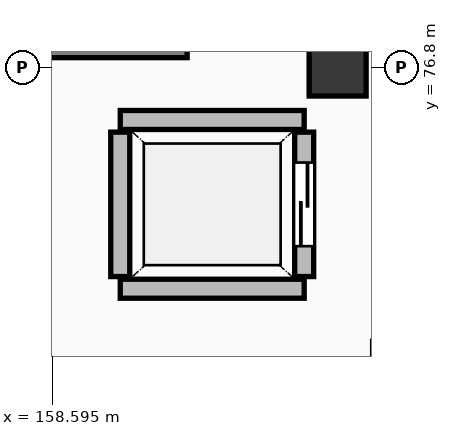
"""IFC4 building model, lengths in metres.
Left out: names, types, materials, properties, quantities, classifications, styles, units other than length and angle.
Written with IfcOpenShell. Run it as: python <this file> out.ifc"""

import sys

from ifc_helpers import new_model, si_unit, direction, frame, frame_2d, origin, origin_2d, place, context, subcontext, project, spatial, rectangle, extrude, element, fill, save


model = new_model("IFC4")
c1 = context("Model", 3, precision=1e-05, world=origin(), true_north=direction((0.0, 1.0)))
c2 = subcontext(c1, "Body", "Model", "MODEL_VIEW")
j1 = project(units=[si_unit("LENGTHUNIT", "METRE"), si_unit("PLANEANGLEUNIT", "RADIAN")], contexts=[c1])
p1 = place(None, origin())
s1 = spatial("IfcSite", under=j1, at=p1, CompositionType="ELEMENT")
p2 = place(p1, origin())
s2 = spatial("IfcBuilding", under=s1, at=p2, CompositionType="ELEMENT")
p3 = place(p2, frame((0.0, 0.0, 28.2)))
s3 = spatial("IfcBuildingStorey", under=s2, at=p3, CompositionType="ELEMENT", Elevation=28.2)
p4 = place(p3, frame((162.35, 76.8, 0.0), z_axis=(0.0, 0.0, 1.0), x_axis=(1.0, 0.0, 0.0)))
e1 = element("IfcColumn", 1, at=p4, inside=s3, PredefinedType="COLUMN", context=c2, shape_type="SweptSolid", body=[
    extrude(rectangle(XDim=0.75, YDim=0.75, at=origin_2d()), origin(), (0.0, 0.0, 1.0), 3.6),
])
p5 = place(p3, frame((156.7, 77.18, 0.0), z_axis=(0.0, 0.0, 1.0), x_axis=(1.0, 0.0, 0.0)))
e2 = element("IfcWall", 2, at=p5, inside=s3, PredefinedType="SHEAR", context=c2, shape_type="SweptSolid", body=[
    extrude(rectangle(XDim=3.67, YDim=0.5, at=frame_2d((1.835, 0.0))), origin(), (0.0, 0.0, 1.0), 3.34),
])
for number, where, z_axis, x_axis in (
    (3, (159.49, 73.89, 0.0), (0.0, 0.0, 1.0), (1.0, 0.0, 0.0)),
    (4, (159.49, 76.11, 0.0), (0.0, 0.0, 1.0), (1.0, 0.0, 0.0)),
):
    element("IfcWall", number, at=place(p3, frame(where, z_axis=z_axis, x_axis=x_axis)), inside=s3, PredefinedType="SOLIDWALL", context=c2, shape_type="SweptSolid", body=[
        extrude(rectangle(XDim=2.42, YDim=0.25, at=frame_2d((1.21, 0.0))), origin(), (0.0, 0.0, 1.0), 3.34),
    ])
p6 = place(p3, frame((159.49, 74.05, 0.0), z_axis=(0.0, 0.0, 1.0), x_axis=(0.0, 1.0, 0.0)))
e5 = element("IfcWall", 5, at=p6, inside=s3, PredefinedType="SOLIDWALL", context=c2, shape_type="SweptSolid", body=[
    extrude(rectangle(XDim=1.9, YDim=0.25, at=frame_2d((0.95, 0.0))), origin(), (0.0, 0.0, 1.0), 3.34),
])
p7 = place(p3, frame((161.91, 74.05, 0.0), z_axis=(0.0, 0.0, 1.0), x_axis=(0.0, 1.0, 0.0)))
e6 = element("IfcWall", 6, at=p7, inside=s3, PredefinedType="SOLIDWALL", context=c2, shape_type="SweptSolid", body=[
    extrude(rectangle(XDim=1.9, YDim=0.25, at=frame_2d((0.95, 0.0))), origin(), (0.0, 0.0, 1.0), 3.34),
])
p8 = place(p7, frame((0.4, 0.0, 0.0)))
e7 = element("IfcOpeningElement", 7, at=p8, cuts=e6, PredefinedType="OPENING", context=c2, shape_type="SweptSolid", body=[
    extrude(rectangle(XDim=1.1, YDim=2.2, at=frame_2d((0.55, 1.1))), frame((0.0, 0.137, 0.0), z_axis=(0.0, -1.0, 0.0), x_axis=(1.0, 0.0, 0.0)), (0.0, 0.0, 1.0), 0.274),
])
p9 = place(p8, origin())
e8 = element("IfcDoor", 8, at=p9, inside=s3, OperationType="SLIDING_TO_LEFT", PredefinedType="DOOR", context=c2, shape_type="SweptSolid", body=[
    extrude(rectangle(XDim=1.1, YDim=2.2, at=frame_2d((0.55, 1.1))), frame((0.0, 0.025, 0.0), z_axis=(0.0, -1.0, 0.0), x_axis=(1.0, 0.0, 0.0)), (0.0, 0.0, 1.0), 0.05),
])
fill(e7, e8)
save(model, sys.argv[1])
